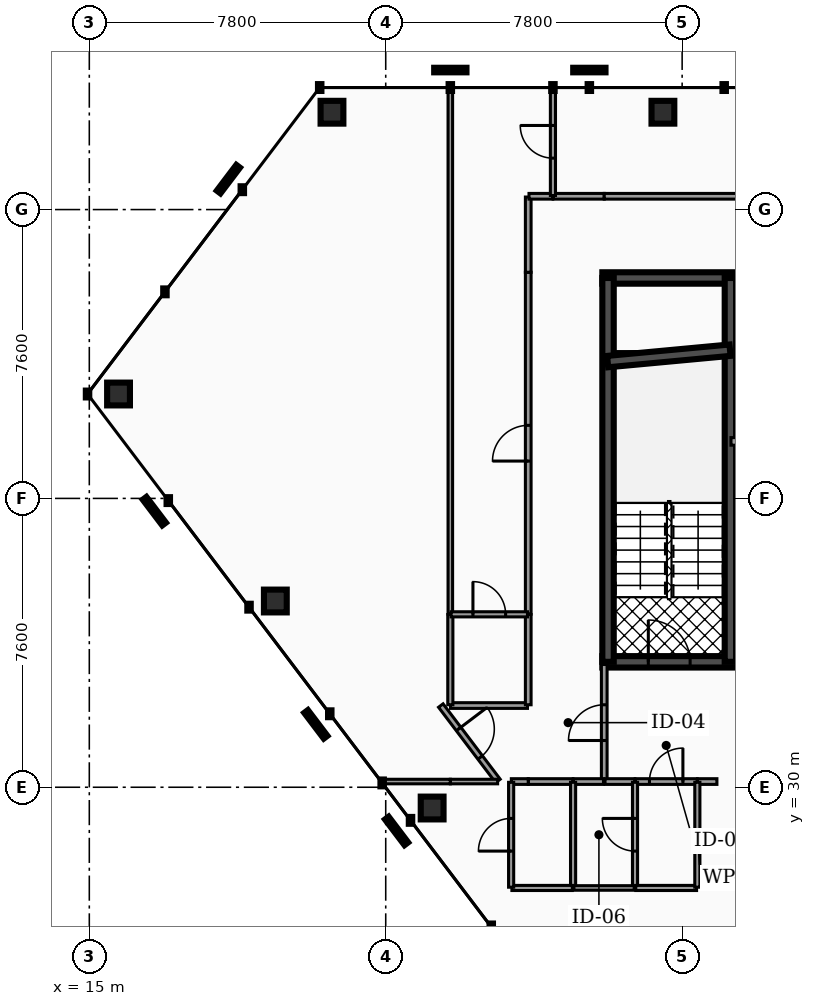
"""IFC4 building model, lengths in metres.
Left out: names, types, materials, properties, quantities, classifications, styles, units other than length and angle.
Written with IfcOpenShell. Run it as: python <this file> out.ifc"""

import sys

from ifc_helpers import new_model, si_unit, direction, frame, frame_2d, origin, origin_2d, place, context, subcontext, project, spatial, rectangle, hollow_rectangle, extrude, element, fill, save


model = new_model("IFC4")
c1 = context("Model", 3, precision=1e-05, world=origin(), true_north=direction((0.0, 1.0)))
c2 = subcontext(c1, "Body", "Model", "MODEL_VIEW")
j1 = project(units=[si_unit("LENGTHUNIT", "METRE"), si_unit("PLANEANGLEUNIT", "RADIAN")], contexts=[c1])
p1 = place(None, origin())
s1 = spatial("IfcSite", under=j1, at=p1, CompositionType="ELEMENT")
p2 = place(p1, origin())
s2 = spatial("IfcBuilding", under=s1, at=p2, CompositionType="ELEMENT")
p3 = place(p2, frame((0.0, 0.0, 212.16)))
s3 = spatial("IfcBuildingStorey", under=s2, at=p3, CompositionType="ELEMENT", Elevation=212.16)
p4 = place(p3, frame((28.5, 43.4, 0.0), z_axis=(0.0, 0.0, 1.0), x_axis=(1.0, 0.0, 0.0)))
e1 = element("IfcWall", 1, at=p4, inside=s3, PredefinedType="SHEAR", context=c2, shape_type="SweptSolid", body=[
    extrude(rectangle(XDim=19.86, YDim=0.3, at=frame_2d((9.93, 0.0))), origin(), (0.0, 0.0, 1.0), 3.18),
])
p5 = place(p3, frame((28.5, 33.3, 0.0), z_axis=(0.0, 0.0, 1.0), x_axis=(1.0, 0.0, 0.0)))
e2 = element("IfcWall", 2, at=p5, inside=s3, PredefinedType="SHEAR", context=c2, shape_type="SweptSolid", body=[
    extrude(rectangle(XDim=19.86, YDim=0.3, at=frame_2d((9.93, 0.0))), origin(), (0.0, 0.0, 1.0), 3.18),
])
p6 = place(p5, frame((3.93, 0.0, 0.0)))
e3 = element("IfcOpeningElement", 3, at=p6, cuts=e2, PredefinedType="OPENING", context=c2, shape_type="SweptSolid", body=[
    extrude(rectangle(XDim=1.1, YDim=2.15, at=frame_2d((0.55, 1.075))), frame((0.0, 0.16, 0.0), z_axis=(0.0, -1.0, 0.0), x_axis=(1.0, 0.0, 0.0)), (0.0, 0.0, 1.0), 0.32),
])
p7 = place(p5, frame((14.77, 0.0, 0.0)))
e4 = element("IfcOpeningElement", 4, at=p7, cuts=e2, PredefinedType="OPENING", context=c2, shape_type="SweptSolid", body=[
    extrude(rectangle(XDim=1.1, YDim=2.15, at=frame_2d((0.55, 1.075))), frame((0.0, 0.16, 0.0), z_axis=(0.0, -1.0, 0.0), x_axis=(1.0, 0.0, 0.0)), (0.0, 0.0, 1.0), 0.32),
])
p8 = place(p5, frame((11.25, 0.0, 0.0)))
e5 = element("IfcOpeningElement", 5, at=p8, cuts=e2, PredefinedType="OPENING", context=c2, shape_type="SweptSolid", body=[
    extrude(rectangle(XDim=1.0, YDim=2.1, at=frame_2d((0.5, 1.05))), frame((0.0, 0.16, 0.0), z_axis=(0.0, -1.0, 0.0), x_axis=(1.0, 0.0, 0.0)), (0.0, 0.0, 1.0), 0.32),
])
p9 = place(p5, frame((12.95, 0.0, 0.0)))
e6 = element("IfcOpeningElement", 6, at=p9, cuts=e2, PredefinedType="OPENING", context=c2, shape_type="SweptSolid", body=[
    extrude(rectangle(XDim=1.0, YDim=2.1, at=frame_2d((0.5, 1.05))), frame((0.0, 0.16, 0.0), z_axis=(0.0, -1.0, 0.0), x_axis=(1.0, 0.0, 0.0)), (0.0, 0.0, 1.0), 0.32),
])
p10 = place(p5, frame((5.85, 0.0, 0.0)))
e7 = element("IfcOpeningElement", 7, at=p10, cuts=e2, PredefinedType="OPENING", context=c2, shape_type="SweptSolid", body=[
    extrude(rectangle(XDim=1.0, YDim=2.1, at=frame_2d((0.5, 1.05))), frame((0.0, 0.16, 0.0), z_axis=(0.0, -1.0, 0.0), x_axis=(1.0, 0.0, 0.0)), (0.0, 0.0, 1.0), 0.32),
])
p11 = place(p5, frame((1.21, 0.0, 0.0)))
e8 = element("IfcOpeningElement", 8, at=p11, cuts=e2, PredefinedType="OPENING", context=c2, shape_type="SweptSolid", body=[
    extrude(rectangle(XDim=1.1, YDim=2.2, at=frame_2d((0.55, 1.1))), frame((0.0, 0.16, 0.0), z_axis=(0.0, -1.0, 0.0), x_axis=(1.0, 0.0, 0.0)), (0.0, 0.0, 1.0), 0.32),
])
p12 = place(p5, frame((9.34, 0.0, 0.0)))
e9 = element("IfcOpeningElement", 9, at=p12, cuts=e2, PredefinedType="OPENING", context=c2, shape_type="SweptSolid", body=[
    extrude(rectangle(XDim=1.12, YDim=2.05, at=frame_2d((0.56, 1.025))), frame((0.0, 0.16, 0.0), z_axis=(0.0, -1.0, 0.0), x_axis=(1.0, 0.0, 0.0)), (0.0, 0.0, 1.0), 0.32),
])
p13 = place(p5, frame((17.55, 0.0, 0.0)))
e10 = element("IfcOpeningElement", 10, at=p13, cuts=e2, PredefinedType="OPENING", context=c2, shape_type="SweptSolid", body=[
    extrude(rectangle(XDim=1.1, YDim=2.2, at=frame_2d((0.55, 1.1))), frame((0.0, 0.16, 0.0), z_axis=(0.0, -1.0, 0.0), x_axis=(1.0, 0.0, 0.0)), (0.0, 0.0, 1.0), 0.32),
])
for number, where, z_axis, x_axis in (
    (11, (28.65, 33.3, 0.0), (0.0, 0.0, 1.0), (0.0, 1.0, 0.0)),
    (12, (31.87, 33.3, 0.0), (0.0, 0.0, 1.0), (0.0, 1.0, 0.0)),
):
    element("IfcWall", number, at=place(p3, frame(where, z_axis=z_axis, x_axis=x_axis)), inside=s3, PredefinedType="SHEAR", context=c2, shape_type="SweptSolid", body=[
        extrude(rectangle(XDim=10.1, YDim=0.3, at=frame_2d((5.05, 0.0))), origin(), (0.0, 0.0, 1.0), 3.18),
    ])
p14 = place(p3, frame((28.64, 41.2, 0.0), z_axis=(0.0, 0.0, 1.0), x_axis=(0.995687118776, 0.092774789157, 0.0)))
e13 = element("IfcWall", 13, at=p14, inside=s3, PredefinedType="SHEAR", context=c2, shape_type="SweptSolid", body=[
    extrude(rectangle(XDim=3.234, YDim=0.3, at=frame_2d((1.617, 0.0))), origin(), (0.0, 0.0, 1.0), 3.18),
])
for number, where, z_axis, x_axis in (
    (14, (30.094, 47.761, 0.0), (0.0, 0.0, 1.0), (1.0, 0.0, 0.0)),
    (15, (21.386, 47.761, 0.0), (0.0, 0.0, 1.0), (1.0, 0.0, 0.0)),
    (16, (15.769, 40.347, 0.0), (0.0, 0.0, 1.0), (1.0, 0.0, 0.0)),
    (17, (19.895, 34.9, 0.0), (0.0, 0.0, 1.0), (1.0, 0.0, 0.0)),
    (18, (24.021, 29.454, 0.0), (0.0, 0.0, 1.0), (1.0, 0.0, 0.0)),
):
    element("IfcColumn", number, at=place(p3, frame(where, z_axis=z_axis, x_axis=x_axis)), inside=s3, PredefinedType="COLUMN", context=c2, shape_type="SweptSolid", body=[
        extrude(hollow_rectangle(XDim=0.6, YDim=0.6, WallThickness=0.03, at=origin_2d()), origin(), (0.0, 0.0, 1.0), 3.18),
    ])
p15 = place(p3, frame((31.885, 39.1, 0.0), z_axis=(0.0, 0.0, 1.0), x_axis=(1.0, 0.0, 0.0)))
e19 = element("IfcWall", 19, at=p15, inside=s3, PredefinedType="PARTITIONING", context=c2, shape_type="SweptSolid", body=[
    extrude(rectangle(XDim=5.645, YDim=0.2, at=frame_2d((2.823, 0.0))), origin(), (0.0, 0.0, 1.0), 2.235),
])
p16 = place(p3, frame((28.55, 30.17, 0.0), z_axis=(0.0, 0.0, 1.0), x_axis=(0.0, 1.0, 0.0)))
e20 = element("IfcWall", 20, at=p16, inside=s3, PredefinedType="PARTITIONING", context=c2, shape_type="SweptSolid", body=[
    extrude(rectangle(XDim=3.06, YDim=0.15, at=frame_2d((1.53, 0.0))), origin(), (0.0, 0.0, 1.0), 2.235),
])
p17 = place(p16, frame((1.06, 0.0, 0.0)))
e21 = element("IfcOpeningElement", 21, at=p17, cuts=e20, PredefinedType="OPENING", context=c2, shape_type="SweptSolid", body=[
    extrude(rectangle(XDim=0.94, YDim=2.05, at=frame_2d((0.47, 1.025))), frame((0.0, 0.085, 0.0), z_axis=(0.0, -1.0, 0.0), x_axis=(1.0, 0.0, 0.0)), (0.0, 0.0, 1.0), 0.17),
])
p18 = place(p3, frame((29.365, 30.15, 0.0), z_axis=(0.0, 0.0, 1.0), x_axis=(1.0, 0.0, 0.0)))
e22 = element("IfcWall", 22, at=p18, inside=s3, PredefinedType="PARTITIONING", context=c2, shape_type="SweptSolid", body=[
    extrude(rectangle(XDim=1.63, YDim=0.15, at=frame_2d((0.815, 0.0))), origin(), (0.0, 0.0, 1.0), 2.235),
])
p19 = place(p18, frame((0.375, 0.0, 0.0)))
e23 = element("IfcOpeningElement", 23, at=p19, cuts=e22, PredefinedType="OPENING", context=c2, shape_type="SweptSolid", body=[
    extrude(rectangle(XDim=0.88, YDim=2.05, at=frame_2d((0.44, 1.025))), frame((0.0, 0.085, 0.0), z_axis=(0.0, -1.0, 0.0), x_axis=(1.0, 0.0, 0.0)), (0.0, 0.0, 1.0), 0.17),
])
p20 = place(p3, frame((28.57, 30.15, 0.0), z_axis=(0.0, 0.0, 1.0), x_axis=(1.0, 0.0, 0.0)))
e24 = element("IfcWall", 24, at=p20, inside=s3, PredefinedType="PARTITIONING", context=c2, shape_type="SweptSolid", body=[
    extrude(rectangle(XDim=0.785, YDim=0.15, at=frame_2d((0.393, 0.0))), origin(), (0.0, 0.0, 1.0), 2.235),
])
p21 = place(p3, frame((31.005, 30.15, 0.0), z_axis=(0.0, 0.0, 1.0), x_axis=(1.0, 0.0, 0.0)))
e25 = element("IfcWall", 25, at=p21, inside=s3, PredefinedType="PARTITIONING", context=c2, shape_type="SweptSolid", body=[
    extrude(rectangle(XDim=0.51, YDim=0.15, at=frame_2d((0.255, 0.0))), origin(), (0.0, 0.0, 1.0), 2.235),
])
p22 = place(p3, frame((26.55, 30.15, 0.0), z_axis=(0.0, 0.0, 1.0), x_axis=(1.0, 0.0, 0.0)))
e26 = element("IfcWall", 26, at=p22, inside=s3, PredefinedType="PARTITIONING", context=c2, shape_type="SweptSolid", body=[
    extrude(rectangle(XDim=1.175, YDim=0.15, at=frame_2d((0.587, 0.0))), origin(), (0.0, 0.0, 1.0), 2.235),
])
p23 = place(p3, frame((26.105, 30.15, 0.0), z_axis=(0.0, 0.0, 1.0), x_axis=(1.0, 0.0, 0.0)))
e27 = element("IfcWall", 27, at=p23, inside=s3, PredefinedType="PARTITIONING", context=c2, shape_type="SweptSolid", body=[
    extrude(rectangle(XDim=0.445, YDim=0.15, at=frame_2d((0.223, 0.0))), origin(), (0.0, 0.0, 1.0), 2.235),
])
p24 = place(p3, frame((27.735, 30.15, 0.0), z_axis=(0.0, 0.0, 1.0), x_axis=(1.0, 0.0, 0.0)))
e28 = element("IfcWall", 28, at=p24, inside=s3, PredefinedType="PARTITIONING", context=c2, shape_type="SweptSolid", body=[
    extrude(rectangle(XDim=0.795, YDim=0.15, at=frame_2d((0.397, 0.0))), origin(), (0.0, 0.0, 1.0), 2.235),
])
p25 = place(p3, frame((24.25, 32.15, 0.0), z_axis=(0.0, 0.0, 1.0), x_axis=(0.60385391082, -0.797095009637, 0.0)))
e29 = element("IfcWall", 29, at=p25, inside=s3, PredefinedType="PARTITIONING", context=c2, shape_type="SweptSolid", body=[
    extrude(rectangle(XDim=2.489, YDim=0.15, at=frame_2d((1.245, 0.0))), origin(), (0.0, 0.0, 1.0), 2.235),
])
p26 = place(p25, frame((0.775, 0.0, 0.0)))
e30 = element("IfcOpeningElement", 30, at=p26, cuts=e29, PredefinedType="OPENING", context=c2, shape_type="SweptSolid", body=[
    extrude(rectangle(XDim=0.94, YDim=2.05, at=frame_2d((0.47, 1.025))), frame((0.0, 0.085, 0.0), z_axis=(0.0, -1.0, 0.0), x_axis=(1.0, 0.0, 0.0)), (0.0, 0.0, 1.0), 0.17),
])
p27 = place(p3, frame((26.55, 34.555, 0.0), z_axis=(0.0, 0.0, 1.0), x_axis=(0.0, 1.0, 0.0)))
e31 = element("IfcWall", 31, at=p27, inside=s3, PredefinedType="PARTITIONING", context=c2, shape_type="SweptSolid", body=[
    extrude(rectangle(XDim=8.995, YDim=0.15, at=frame_2d((4.498, 0.0))), origin(), (0.0, 0.0, 1.0), 2.235),
])
p28 = place(p27, frame((4.028, 0.0, 0.0)))
e32 = element("IfcOpeningElement", 32, at=p28, cuts=e31, PredefinedType="OPENING", context=c2, shape_type="SweptSolid", body=[
    extrude(rectangle(XDim=0.94, YDim=2.05, at=frame_2d((0.47, 1.025))), frame((0.0, 0.085, 0.0), z_axis=(0.0, -1.0, 0.0), x_axis=(1.0, 0.0, 0.0)), (0.0, 0.0, 1.0), 0.17),
])
p29 = place(p3, frame((26.55, 43.55, 0.0), z_axis=(0.0, 0.0, 1.0), x_axis=(0.0, 1.0, 0.0)))
e33 = element("IfcWall", 33, at=p29, inside=s3, PredefinedType="PARTITIONING", context=c2, shape_type="SweptSolid", body=[
    extrude(rectangle(XDim=1.98, YDim=0.15, at=frame_2d((0.99, 0.0))), origin(), (0.0, 0.0, 1.0), 2.235),
])
p30 = place(p3, frame((26.57, 45.55, 0.0), z_axis=(0.0, 0.0, 1.0), x_axis=(1.0, 0.0, 0.0)))
e34 = element("IfcWall", 34, at=p30, inside=s3, PredefinedType="PARTITIONING", context=c2, shape_type="SweptSolid", body=[
    extrude(rectangle(XDim=0.625, YDim=0.15, at=frame_2d((0.312, 0.0))), origin(), (0.0, 0.0, 1.0), 2.235),
])
p31 = place(p3, frame((27.205, 45.55, 0.0), z_axis=(0.0, 0.0, 1.0), x_axis=(1.0, 0.0, 0.0)))
e35 = element("IfcWall", 35, at=p31, inside=s3, PredefinedType="PARTITIONING", context=c2, shape_type="SweptSolid", body=[
    extrude(rectangle(XDim=1.345, YDim=0.15, at=frame_2d((0.672, 0.0))), origin(), (0.0, 0.0, 1.0), 2.235),
])
p32 = place(p3, frame((28.55, 45.55, 0.0), z_axis=(0.0, 0.0, 1.0), x_axis=(1.0, 0.0, 0.0)))
e36 = element("IfcWall", 36, at=p32, inside=s3, PredefinedType="PARTITIONING", context=c2, shape_type="SweptSolid", body=[
    extrude(rectangle(XDim=4.945, YDim=0.15, at=frame_2d((2.473, 0.0))), origin(), (0.0, 0.0, 1.0), 2.235),
])
p33 = place(p3, frame((24.505, 32.15, 0.0), z_axis=(0.0, 0.0, 1.0), x_axis=(1.0, 0.0, 0.0)))
e37 = element("IfcWall", 37, at=p33, inside=s3, PredefinedType="PARTITIONING", context=c2, shape_type="SweptSolid", body=[
    extrude(rectangle(XDim=2.025, YDim=0.15, at=frame_2d((1.013, 0.0))), origin(), (0.0, 0.0, 1.0), 2.235),
])
p34 = place(p3, frame((26.55, 32.17, 0.0), z_axis=(0.0, 0.0, 1.0), x_axis=(0.0, 1.0, 0.0)))
e38 = element("IfcWall", 38, at=p34, inside=s3, PredefinedType="PARTITIONING", context=c2, shape_type="SweptSolid", body=[
    extrude(rectangle(XDim=2.375, YDim=0.15, at=frame_2d((1.188, 0.0))), origin(), (0.0, 0.0, 1.0), 2.235),
])
p35 = place(p3, frame((29.36, 27.37, 0.0), z_axis=(0.0, 0.0, 1.0), x_axis=(0.0, 1.0, 0.0)))
e39 = element("IfcWall", 39, at=p35, inside=s3, PredefinedType="PARTITIONING", context=c2, shape_type="SweptSolid", body=[
    extrude(rectangle(XDim=2.76, YDim=0.135, at=frame_2d((1.38, 0.0))), origin(), (0.0, 0.0, 1.0), 2.235),
])
p36 = place(p35, frame((0.95, 0.0, 0.0)))
e40 = element("IfcOpeningElement", 40, at=p36, cuts=e39, PredefinedType="OPENING", context=c2, shape_type="SweptSolid", body=[
    extrude(rectangle(XDim=0.86, YDim=2.05, at=frame_2d((0.43, 1.025))), frame((0.0, 0.077, 0.0), z_axis=(0.0, -1.0, 0.0), x_axis=(1.0, 0.0, 0.0)), (0.0, 0.0, 1.0), 0.155),
])
p37 = place(p3, frame((29.38, 27.35, 0.0), z_axis=(0.0, 0.0, 1.0), x_axis=(1.0, 0.0, 0.0)))
e41 = element("IfcWall", 41, at=p37, inside=s3, PredefinedType="PARTITIONING", context=c2, shape_type="SweptSolid", body=[
    extrude(rectangle(XDim=1.6, YDim=0.135, at=frame_2d((0.8, 0.0))), origin(), (0.0, 0.0, 1.0), 2.235),
])
for number, where, z_axis, x_axis in (
    (42, (31.0, 27.37, 0.0), (0.0, 0.0, 1.0), (0.0, 1.0, 0.0)),
    (43, (27.73, 27.37, 0.0), (0.0, 0.0, 1.0), (0.0, 1.0, 0.0)),
):
    element("IfcWall", number, at=place(p3, frame(where, z_axis=z_axis, x_axis=x_axis)), inside=s3, PredefinedType="PARTITIONING", context=c2, shape_type="SweptSolid", body=[
        extrude(rectangle(XDim=2.76, YDim=0.135, at=frame_2d((1.38, 0.0))), origin(), (0.0, 0.0, 1.0), 2.235),
    ])
p38 = place(p3, frame((26.12, 27.35, 0.0), z_axis=(0.0, 0.0, 1.0), x_axis=(1.0, 0.0, 0.0)))
e44 = element("IfcWall", 44, at=p38, inside=s3, PredefinedType="PARTITIONING", context=c2, shape_type="SweptSolid", body=[
    extrude(rectangle(XDim=1.59, YDim=0.135, at=frame_2d((0.795, 0.0))), origin(), (0.0, 0.0, 1.0), 2.235),
])
p39 = place(p3, frame((26.1, 27.37, 0.0), z_axis=(0.0, 0.0, 1.0), x_axis=(0.0, 1.0, 0.0)))
e45 = element("IfcWall", 45, at=p39, inside=s3, PredefinedType="PARTITIONING", context=c2, shape_type="SweptSolid", body=[
    extrude(rectangle(XDim=2.76, YDim=0.135, at=frame_2d((1.38, 0.0))), origin(), (0.0, 0.0, 1.0), 2.235),
])
p40 = place(p39, frame((0.95, 0.0, 0.0)))
e46 = element("IfcOpeningElement", 46, at=p40, cuts=e45, PredefinedType="OPENING", context=c2, shape_type="SweptSolid", body=[
    extrude(rectangle(XDim=0.86, YDim=2.05, at=frame_2d((0.43, 1.025))), frame((0.0, 0.077, 0.0), z_axis=(0.0, -1.0, 0.0), x_axis=(1.0, 0.0, 0.0)), (0.0, 0.0, 1.0), 0.155),
])
p41 = place(p3, frame((27.75, 27.35, 0.0), z_axis=(0.0, 0.0, 1.0), x_axis=(1.0, 0.0, 0.0)))
e47 = element("IfcWall", 47, at=p41, inside=s3, PredefinedType="PARTITIONING", context=c2, shape_type="SweptSolid", body=[
    extrude(rectangle(XDim=1.59, YDim=0.12, at=frame_2d((0.795, 0.0))), origin(), (0.0, 0.0, 1.0), 2.235),
])
p42 = place(p3, frame((24.5, 30.15, 0.0), z_axis=(0.0, 0.0, 1.0), x_axis=(1.0, 0.0, 0.0)))
e48 = element("IfcWall", 48, at=p42, inside=s3, PredefinedType="PARTITIONING", context=c2, shape_type="SweptSolid", body=[
    extrude(rectangle(XDim=1.245, YDim=0.12, at=frame_2d((0.623, 0.0))), origin(), (0.0, 0.0, 1.0), 2.235),
])
p43 = place(p3, frame((22.694, 30.15, 0.0), z_axis=(0.0, 0.0, 1.0), x_axis=(1.0, 0.0, 0.0)))
e49 = element("IfcWall", 49, at=p43, inside=s3, PredefinedType="PARTITIONING", context=c2, shape_type="SweptSolid", body=[
    extrude(rectangle(XDim=1.806, YDim=0.12, at=frame_2d((0.903, 0.0))), origin(), (0.0, 0.0, 1.0), 2.235),
])
p44 = place(p3, frame((24.5, 34.555, 0.0), z_axis=(0.0, 0.0, 1.0), x_axis=(0.0, 1.0, 0.0)))
e50 = element("IfcWall", 50, at=p44, inside=s3, PredefinedType="PARTITIONING", context=c2, shape_type="SweptSolid", body=[
    extrude(rectangle(XDim=13.841, YDim=0.12, at=frame_2d((6.92, 0.0))), origin(), (0.0, 0.0, 1.0), 2.235),
])
p45 = place(p3, frame((24.5, 32.17, 0.0), z_axis=(0.0, 0.0, 1.0), x_axis=(0.0, 1.0, 0.0)))
e51 = element("IfcWall", 51, at=p45, inside=s3, PredefinedType="PARTITIONING", context=c2, shape_type="SweptSolid", body=[
    extrude(rectangle(XDim=2.375, YDim=0.135, at=frame_2d((1.188, 0.0))), origin(), (0.0, 0.0, 1.0), 2.235),
])
p46 = place(p3, frame((27.2, 45.57, 0.0), z_axis=(0.0, 0.0, 1.0), x_axis=(0.0, 1.0, 0.0)))
e52 = element("IfcWall", 52, at=p46, inside=s3, PredefinedType="PARTITIONING", context=c2, shape_type="SweptSolid", body=[
    extrude(rectangle(XDim=2.826, YDim=0.135, at=frame_2d((1.413, 0.0))), origin(), (0.0, 0.0, 1.0), 2.235),
])
p47 = place(p46, frame((0.983, 0.0, 0.0)))
e53 = element("IfcOpeningElement", 53, at=p47, cuts=e52, PredefinedType="OPENING", context=c2, shape_type="SweptSolid", body=[
    extrude(rectangle(XDim=0.86, YDim=2.05, at=frame_2d((0.43, 1.025))), frame((0.0, 0.077, 0.0), z_axis=(0.0, -1.0, 0.0), x_axis=(1.0, 0.0, 0.0)), (0.0, 0.0, 1.0), 0.155),
])
p48 = place(p3, frame((24.52, 34.55, 0.0), z_axis=(0.0, 0.0, 1.0), x_axis=(1.0, 0.0, 0.0)))
e54 = element("IfcWall", 54, at=p48, inside=s3, PredefinedType="PARTITIONING", context=c2, shape_type="SweptSolid", body=[
    extrude(rectangle(XDim=2.01, YDim=0.135, at=frame_2d((1.005, 0.0))), origin(), (0.0, 0.0, 1.0), 2.235),
])
p49 = place(p48, frame((0.575, 0.0, 0.0)))
e55 = element("IfcOpeningElement", 55, at=p49, cuts=e54, PredefinedType="OPENING", context=c2, shape_type="SweptSolid", body=[
    extrude(rectangle(XDim=0.86, YDim=2.05, at=frame_2d((0.43, 1.025))), frame((0.0, 0.077, 0.0), z_axis=(0.0, -1.0, 0.0), x_axis=(1.0, 0.0, 0.0)), (0.0, 0.0, 1.0), 0.155),
])
p50 = place(p11, origin())
e56 = element("IfcDoor", 56, at=p50, inside=s3, OperationType="SINGLE_SWING_LEFT", PredefinedType="DOOR", context=c2, shape_type="SweptSolid", body=[
    extrude(rectangle(XDim=1.1, YDim=2.2, at=frame_2d((0.55, 1.1))), frame((0.0, 0.025, 0.0), z_axis=(0.0, -1.0, 0.0), x_axis=(1.0, 0.0, 0.0)), (0.0, 0.0, 1.0), 0.05),
])
fill(e8, e56)
p51 = place(p17, origin())
e57 = element("IfcDoor", 57, at=p51, inside=s3, OperationType="SINGLE_SWING_LEFT", PredefinedType="DOOR", context=c2, shape_type="SweptSolid", body=[
    extrude(rectangle(XDim=0.94, YDim=2.05, at=frame_2d((0.47, 1.025))), frame((0.0, 0.025, 0.0), z_axis=(0.0, -1.0, 0.0), x_axis=(1.0, 0.0, 0.0)), (0.0, 0.0, 1.0), 0.05),
])
fill(e21, e57)
p52 = place(p19, origin())
e58 = element("IfcDoor", 58, at=p52, inside=s3, OperationType="SINGLE_SWING_RIGHT", PredefinedType="DOOR", context=c2, shape_type="SweptSolid", body=[
    extrude(rectangle(XDim=0.88, YDim=2.05, at=frame_2d((0.44, 1.025))), frame((0.0, 0.025, 0.0), z_axis=(0.0, -1.0, 0.0), x_axis=(1.0, 0.0, 0.0)), (0.0, 0.0, 1.0), 0.05),
])
fill(e23, e58)
p53 = place(p26, origin())
e59 = element("IfcDoor", 59, at=p53, inside=s3, OperationType="SINGLE_SWING_LEFT", PredefinedType="DOOR", context=c2, shape_type="SweptSolid", body=[
    extrude(rectangle(XDim=0.94, YDim=2.05, at=frame_2d((0.47, 1.025))), frame((0.0, 0.025, 0.0), z_axis=(0.0, -1.0, 0.0), x_axis=(1.0, 0.0, 0.0)), (0.0, 0.0, 1.0), 0.05),
])
fill(e30, e59)
p54 = place(p28, origin())
e60 = element("IfcDoor", 60, at=p54, inside=s3, OperationType="SINGLE_SWING_LEFT", PredefinedType="DOOR", context=c2, shape_type="SweptSolid", body=[
    extrude(rectangle(XDim=0.94, YDim=2.05, at=frame_2d((0.47, 1.025))), frame((0.0, 0.025, 0.0), z_axis=(0.0, -1.0, 0.0), x_axis=(1.0, 0.0, 0.0)), (0.0, 0.0, 1.0), 0.05),
])
fill(e32, e60)
p55 = place(p36, origin())
e61 = element("IfcDoor", 61, at=p55, inside=s3, OperationType="SINGLE_SWING_RIGHT", PredefinedType="DOOR", context=c2, shape_type="SweptSolid", body=[
    extrude(rectangle(XDim=0.86, YDim=2.05, at=frame_2d((0.43, 1.025))), frame((0.0, 0.025, 0.0), z_axis=(0.0, -1.0, 0.0), x_axis=(1.0, 0.0, 0.0)), (0.0, 0.0, 1.0), 0.05),
])
fill(e40, e61)
p56 = place(p40, origin())
e62 = element("IfcDoor", 62, at=p56, inside=s3, OperationType="SINGLE_SWING_LEFT", PredefinedType="DOOR", context=c2, shape_type="SweptSolid", body=[
    extrude(rectangle(XDim=0.86, YDim=2.05, at=frame_2d((0.43, 1.025))), frame((0.0, 0.025, 0.0), z_axis=(0.0, -1.0, 0.0), x_axis=(1.0, 0.0, 0.0)), (0.0, 0.0, 1.0), 0.05),
])
fill(e46, e62)
p57 = place(p47, origin())
e63 = element("IfcDoor", 63, at=p57, inside=s3, OperationType="SINGLE_SWING_RIGHT", PredefinedType="DOOR", context=c2, shape_type="SweptSolid", body=[
    extrude(rectangle(XDim=0.86, YDim=2.05, at=frame_2d((0.43, 1.025))), frame((0.0, 0.025, 0.0), z_axis=(0.0, -1.0, 0.0), x_axis=(1.0, 0.0, 0.0)), (0.0, 0.0, 1.0), 0.05),
])
fill(e53, e63)
p58 = place(p49, origin())
e64 = element("IfcDoor", 64, at=p58, inside=s3, OperationType="SINGLE_SWING_LEFT", PredefinedType="DOOR", context=c2, shape_type="SweptSolid", body=[
    extrude(rectangle(XDim=0.86, YDim=2.05, at=frame_2d((0.43, 1.025))), frame((0.0, 0.025, 0.0), z_axis=(0.0, -1.0, 0.0), x_axis=(1.0, 0.0, 0.0)), (0.0, 0.0, 1.0), 0.05),
])
fill(e55, e64)
save(model, sys.argv[1])
